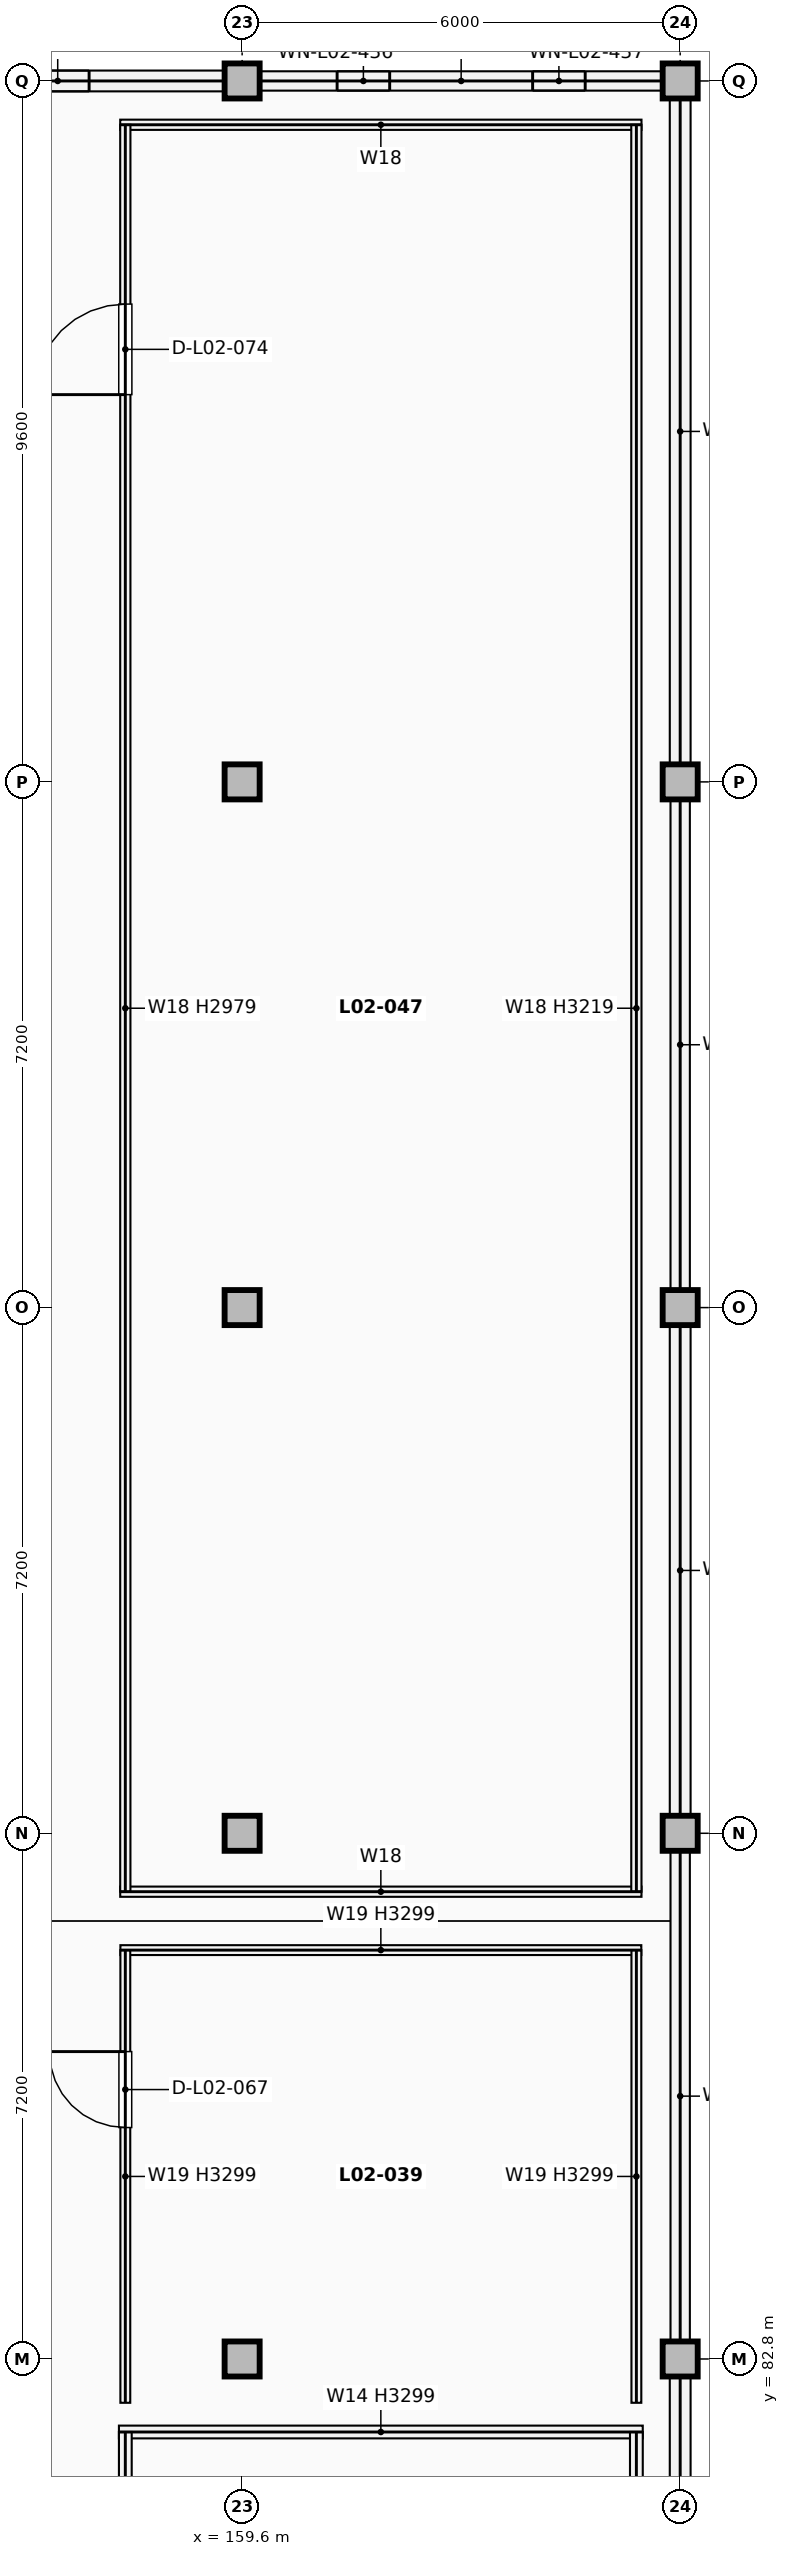
"""IFC4 building model, lengths in metres.
Left out: names, types, materials, properties, quantities, classifications, styles, units other than length and angle.
Written with IfcOpenShell. Run it as: python <this file> out.ifc"""

import sys

from ifc_helpers import new_model, si_unit, direction, frame, frame_2d, origin, origin_2d, place, context, subcontext, project, spatial, rectangle, extrude, element, fill, save


model = new_model("IFC4")
c1 = context("Model", 3, precision=1e-05, world=origin(), true_north=direction((0.0, 1.0)))
c2 = subcontext(c1, "Body", "Model", "MODEL_VIEW")
j1 = project(units=[si_unit("LENGTHUNIT", "METRE"), si_unit("PLANEANGLEUNIT", "RADIAN")], contexts=[c1])
p1 = place(None, origin())
s1 = spatial("IfcSite", under=j1, at=p1, CompositionType="ELEMENT")
p2 = place(p1, origin())
s2 = spatial("IfcBuilding", under=s1, at=p2, CompositionType="ELEMENT")
p3 = place(p2, frame((0.0, 0.0, 9.52)))
s3 = spatial("IfcBuildingStorey", under=s2, at=p3, CompositionType="ELEMENT", Elevation=9.52)
for number, where, z_axis, x_axis in (
    (1, (159.6, 82.8, 0.0), (0.0, 0.0, 1.0), (1.0, 0.0, 0.0)),
    (2, (159.6, 90.0, 0.0), (0.0, 0.0, 1.0), (1.0, 0.0, 0.0)),
    (3, (159.6, 97.2, 0.0), (0.0, 0.0, 1.0), (1.0, 0.0, 0.0)),
    (4, (159.6, 104.4, 0.0), (0.0, 0.0, 1.0), (1.0, 0.0, 0.0)),
    (5, (159.6, 114.0, 0.0), (0.0, 0.0, 1.0), (1.0, 0.0, 0.0)),
    (6, (165.6, 82.8, 0.0), (0.0, 0.0, 1.0), (1.0, 0.0, 0.0)),
    (7, (165.6, 90.0, 0.0), (0.0, 0.0, 1.0), (1.0, 0.0, 0.0)),
    (8, (165.6, 97.2, 0.0), (0.0, 0.0, 1.0), (1.0, 0.0, 0.0)),
    (9, (165.6, 104.4, 0.0), (0.0, 0.0, 1.0), (1.0, 0.0, 0.0)),
    (10, (165.6, 114.0, 0.0), (0.0, 0.0, 1.0), (1.0, 0.0, 0.0)),
):
    element("IfcColumn", number, at=place(p3, frame(where, z_axis=z_axis, x_axis=x_axis)), inside=s3, PredefinedType="COLUMN", context=c2, shape_type="SweptSolid", body=[
        extrude(rectangle(XDim=0.48, YDim=0.48, at=origin_2d()), origin(), (0.0, 0.0, 1.0), 4.08),
    ])
p4 = place(p3, frame((150.242, 114.0, 0.0), z_axis=(0.0, 0.0, 1.0), x_axis=(1.0, 0.0, 0.0)))
e11 = element("IfcWall", 11, at=p4, inside=s3, PredefinedType="SOLIDWALL", context=c2, shape_type="SweptSolid", body=[
    extrude(rectangle(XDim=9.116, YDim=0.285, at=frame_2d((4.558, 0.0))), origin(), (0.0, 0.0, 1.0), 3.299),
])
p5 = place(p4, frame((1.854, 0.0, 0.75)))
e12 = element("IfcOpeningElement", 12, at=p5, cuts=e11, PredefinedType="OPENING", context=c2, shape_type="SweptSolid", body=[
    extrude(rectangle(XDim=0.86, YDim=2.32, at=frame_2d((0.43, 1.16))), frame((0.0, 0.152, 0.0), z_axis=(0.0, -1.0, 0.0), x_axis=(1.0, 0.0, 0.0)), (0.0, 0.0, 1.0), 0.305),
])
p6 = place(p4, frame((4.128, 0.0, 0.75)))
e13 = element("IfcOpeningElement", 13, at=p6, cuts=e11, PredefinedType="OPENING", context=c2, shape_type="SweptSolid", body=[
    extrude(rectangle(XDim=0.86, YDim=2.32, at=frame_2d((0.43, 1.16))), frame((0.0, 0.152, 0.0), z_axis=(0.0, -1.0, 0.0), x_axis=(1.0, 0.0, 0.0)), (0.0, 0.0, 1.0), 0.305),
])
p7 = place(p4, frame((6.402, 0.0, 0.75)))
e14 = element("IfcOpeningElement", 14, at=p7, cuts=e11, PredefinedType="OPENING", context=c2, shape_type="SweptSolid", body=[
    extrude(rectangle(XDim=0.86, YDim=2.32, at=frame_2d((0.43, 1.16))), frame((0.0, 0.152, 0.0), z_axis=(0.0, -1.0, 0.0), x_axis=(1.0, 0.0, 0.0)), (0.0, 0.0, 1.0), 0.305),
])
p8 = place(p3, frame((159.842, 114.0, 0.0), z_axis=(0.0, 0.0, 1.0), x_axis=(1.0, 0.0, 0.0)))
e15 = element("IfcWall", 15, at=p8, inside=s3, PredefinedType="SOLIDWALL", context=c2, shape_type="SweptSolid", body=[
    extrude(rectangle(XDim=5.516, YDim=0.265, at=frame_2d((2.758, 0.0))), origin(), (0.0, 0.0, 1.0), 3.299),
])
p9 = place(p8, frame((1.059, 0.0, 0.75)))
e16 = element("IfcOpeningElement", 16, at=p9, cuts=e15, PredefinedType="OPENING", context=c2, shape_type="SweptSolid", body=[
    extrude(rectangle(XDim=0.72, YDim=2.24, at=frame_2d((0.36, 1.12))), frame((0.0, 0.143, 0.0), z_axis=(0.0, -1.0, 0.0), x_axis=(1.0, 0.0, 0.0)), (0.0, 0.0, 1.0), 0.285),
])
p10 = place(p8, frame((3.737, 0.0, 0.75)))
e17 = element("IfcOpeningElement", 17, at=p10, cuts=e15, PredefinedType="OPENING", context=c2, shape_type="SweptSolid", body=[
    extrude(rectangle(XDim=0.72, YDim=2.24, at=frame_2d((0.36, 1.12))), frame((0.0, 0.143, 0.0), z_axis=(0.0, -1.0, 0.0), x_axis=(1.0, 0.0, 0.0)), (0.0, 0.0, 1.0), 0.285),
])
p11 = place(p3, frame((165.6, 79.442, 0.0), z_axis=(0.0, 0.0, 1.0), x_axis=(0.0, 1.0, 0.0)))
e18 = element("IfcWall", 18, at=p11, inside=s3, PredefinedType="SOLIDWALL", context=c2, shape_type="SweptSolid", body=[
    extrude(rectangle(XDim=3.116, YDim=0.285, at=frame_2d((1.558, 0.0))), origin(), (0.0, 0.0, 1.0), 3.194),
])
p12 = place(p3, frame((165.6, 83.042, 0.0), z_axis=(0.0, 0.0, 1.0), x_axis=(0.0, 1.0, 0.0)))
e19 = element("IfcWall", 19, at=p12, inside=s3, PredefinedType="SOLIDWALL", context=c2, shape_type="SweptSolid", body=[
    extrude(rectangle(XDim=6.716, YDim=0.265, at=frame_2d((3.358, 0.0))), origin(), (0.0, 0.0, 1.0), 3.219),
])
p13 = place(p3, frame((165.6, 90.242, 0.0), z_axis=(0.0, 0.0, 1.0), x_axis=(0.0, 1.0, 0.0)))
e20 = element("IfcWall", 20, at=p13, inside=s3, PredefinedType="SOLIDWALL", context=c2, shape_type="SweptSolid", body=[
    extrude(rectangle(XDim=6.716, YDim=0.285, at=frame_2d((3.358, 0.0))), origin(), (0.0, 0.0, 1.0), 3.219),
])
p14 = place(p3, frame((165.6, 97.442, 0.0), z_axis=(0.0, 0.0, 1.0), x_axis=(0.0, 1.0, 0.0)))
e21 = element("IfcWall", 21, at=p14, inside=s3, PredefinedType="SOLIDWALL", context=c2, shape_type="SweptSolid", body=[
    extrude(rectangle(XDim=6.716, YDim=0.265, at=frame_2d((3.358, 0.0))), origin(), (0.0, 0.0, 1.0), 3.219),
])
p15 = place(p3, frame((165.6, 104.642, 0.0), z_axis=(0.0, 0.0, 1.0), x_axis=(0.0, 1.0, 0.0)))
e22 = element("IfcWall", 22, at=p15, inside=s3, PredefinedType="SOLIDWALL", context=c2, shape_type="SweptSolid", body=[
    extrude(rectangle(XDim=9.116, YDim=0.285, at=frame_2d((4.558, 0.0))), origin(), (0.0, 0.0, 1.0), 3.219),
])
p16 = place(p3, frame((157.913, 81.8, 0.0), z_axis=(0.0, 0.0, 1.0), x_axis=(1.0, 0.0, 0.0)))
e23 = element("IfcWall", 23, at=p16, inside=s3, PredefinedType="PARTITIONING", context=c2, shape_type="SweptSolid", body=[
    extrude(rectangle(XDim=7.175, YDim=0.175, at=frame_2d((3.587, 0.0))), origin(), (0.0, 0.0, 1.0), 3.299),
])
p17 = place(p3, frame((158.0, 72.2, 0.0), z_axis=(0.0, 0.0, 1.0), x_axis=(0.0, 1.0, 0.0)))
e24 = element("IfcWall", 24, at=p17, inside=s3, PredefinedType="PARTITIONING", context=c2, shape_type="SweptSolid", body=[
    extrude(rectangle(XDim=9.6, YDim=0.175, at=frame_2d((4.8, 0.0))), origin(), (0.0, 0.0, 1.0), 3.194),
])
p18 = place(p17, frame((2.245, 0.0, 0.0)))
e25 = element("IfcOpeningElement", 25, at=p18, cuts=e24, PredefinedType="OPENING", context=c2, shape_type="SweptSolid", body=[
    extrude(rectangle(XDim=1.02, YDim=2.18, at=frame_2d((0.51, 1.09))), frame((0.0, 0.098, 0.0), z_axis=(0.0, -1.0, 0.0), x_axis=(1.0, 0.0, 0.0)), (0.0, 0.0, 1.0), 0.195),
])
p19 = place(p3, frame((165.0, 72.2, 0.0), z_axis=(0.0, 0.0, 1.0), x_axis=(0.0, 1.0, 0.0)))
e26 = element("IfcWall", 26, at=p19, inside=s3, PredefinedType="PARTITIONING", context=c2, shape_type="SweptSolid", body=[
    extrude(rectangle(XDim=9.6, YDim=0.175, at=frame_2d((4.8, 0.0))), origin(), (0.0, 0.0, 1.0), 3.194),
])
p20 = place(p3, frame((157.933, 88.4, 0.0), z_axis=(0.0, 0.0, 1.0), x_axis=(1.0, 0.0, 0.0)))
e27 = element("IfcWall", 27, at=p20, inside=s3, PredefinedType="PARTITIONING", context=c2, shape_type="SweptSolid", body=[
    extrude(rectangle(XDim=7.135, YDim=0.135, at=frame_2d((3.567, 0.0))), origin(), (0.0, 0.0, 1.0), 3.299),
])
p21 = place(p3, frame((158.0, 82.2, 0.0), z_axis=(0.0, 0.0, 1.0), x_axis=(0.0, 1.0, 0.0)))
e28 = element("IfcWall", 28, at=p21, inside=s3, PredefinedType="PARTITIONING", context=c2, shape_type="SweptSolid", body=[
    extrude(rectangle(XDim=6.2, YDim=0.135, at=frame_2d((3.1, 0.0))), origin(), (0.0, 0.0, 1.0), 3.299),
])
p22 = place(p21, frame((3.77, 0.0, 0.0)))
e29 = element("IfcOpeningElement", 29, at=p22, cuts=e28, PredefinedType="OPENING", context=c2, shape_type="SweptSolid", body=[
    extrude(rectangle(XDim=1.04, YDim=2.12, at=frame_2d((0.52, 1.06))), frame((0.0, 0.078, 0.0), z_axis=(0.0, -1.0, 0.0), x_axis=(1.0, 0.0, 0.0)), (0.0, 0.0, 1.0), 0.155),
])
p23 = place(p3, frame((165.0, 82.2, 0.0), z_axis=(0.0, 0.0, 1.0), x_axis=(0.0, 1.0, 0.0)))
e30 = element("IfcWall", 30, at=p23, inside=s3, PredefinedType="PARTITIONING", context=c2, shape_type="SweptSolid", body=[
    extrude(rectangle(XDim=6.2, YDim=0.135, at=frame_2d((3.1, 0.0))), origin(), (0.0, 0.0, 1.0), 3.299),
])
for number, where, z_axis, x_axis in (
    (31, (157.93, 89.2, 0.0), (0.0, 0.0, 1.0), (1.0, 0.0, 0.0)),
    (32, (157.93, 113.4, 0.0), (0.0, 0.0, 1.0), (1.0, 0.0, 0.0)),
):
    element("IfcWall", number, at=place(p3, frame(where, z_axis=z_axis, x_axis=x_axis)), inside=s3, PredefinedType="PARTITIONING", context=c2, shape_type="SweptSolid", body=[
        extrude(rectangle(XDim=7.14, YDim=0.14, at=frame_2d((3.57, 0.0))), origin(), (0.0, 0.0, 1.0), 3.299),
    ])
p24 = place(p3, frame((158.0, 89.2, 0.0), z_axis=(0.0, 0.0, 1.0), x_axis=(0.0, 1.0, 0.0)))
e33 = element("IfcWall", 33, at=p24, inside=s3, PredefinedType="PARTITIONING", context=c2, shape_type="SweptSolid", body=[
    extrude(rectangle(XDim=24.2, YDim=0.14, at=frame_2d((12.1, 0.0))), origin(), (0.0, 0.0, 1.0), 2.979),
])
p25 = place(p24, frame((20.504, 0.0, 0.0)))
e34 = element("IfcOpeningElement", 34, at=p25, cuts=e33, PredefinedType="OPENING", context=c2, shape_type="SweptSolid", body=[
    extrude(rectangle(XDim=1.24, YDim=2.2, at=frame_2d((0.62, 1.1))), frame((0.0, 0.08, 0.0), z_axis=(0.0, -1.0, 0.0), x_axis=(1.0, 0.0, 0.0)), (0.0, 0.0, 1.0), 0.16),
])
p26 = place(p3, frame((165.0, 89.2, 0.0), z_axis=(0.0, 0.0, 1.0), x_axis=(0.0, 1.0, 0.0)))
e35 = element("IfcWall", 35, at=p26, inside=s3, PredefinedType="PARTITIONING", context=c2, shape_type="SweptSolid", body=[
    extrude(rectangle(XDim=24.2, YDim=0.14, at=frame_2d((12.1, 0.0))), origin(), (0.0, 0.0, 1.0), 3.219),
])
p27 = place(p7, origin())
e36 = element("IfcWindow", 36, at=p27, inside=s3, PartitioningType="SINGLE_PANEL", PredefinedType="WINDOW", context=c2, shape_type="SweptSolid", body=[
    extrude(rectangle(XDim=0.86, YDim=2.32, at=frame_2d((0.43, 1.16))), frame((0.0, 0.03, 0.0), z_axis=(0.0, -1.0, 0.0), x_axis=(1.0, 0.0, 0.0)), (0.0, 0.0, 1.0), 0.06),
])
fill(e14, e36)
p28 = place(p9, origin())
e37 = element("IfcWindow", 37, at=p28, inside=s3, PartitioningType="SINGLE_PANEL", PredefinedType="WINDOW", context=c2, shape_type="SweptSolid", body=[
    extrude(rectangle(XDim=0.72, YDim=2.24, at=frame_2d((0.36, 1.12))), frame((0.0, 0.03, 0.0), z_axis=(0.0, -1.0, 0.0), x_axis=(1.0, 0.0, 0.0)), (0.0, 0.0, 1.0), 0.06),
])
fill(e16, e37)
p29 = place(p10, origin())
e38 = element("IfcWindow", 38, at=p29, inside=s3, PartitioningType="SINGLE_PANEL", PredefinedType="WINDOW", context=c2, shape_type="SweptSolid", body=[
    extrude(rectangle(XDim=0.72, YDim=2.24, at=frame_2d((0.36, 1.12))), frame((0.0, 0.03, 0.0), z_axis=(0.0, -1.0, 0.0), x_axis=(1.0, 0.0, 0.0)), (0.0, 0.0, 1.0), 0.06),
])
fill(e17, e38)
p30 = place(p22, origin())
e39 = element("IfcDoor", 39, at=p30, inside=s3, OperationType="SINGLE_SWING_RIGHT", PredefinedType="DOOR", context=c2, shape_type="SweptSolid", body=[
    extrude(rectangle(XDim=1.04, YDim=2.12, at=frame_2d((0.52, 1.06))), frame((0.0, 0.025, 0.0), z_axis=(0.0, -1.0, 0.0), x_axis=(1.0, 0.0, 0.0)), (0.0, 0.0, 1.0), 0.05),
])
fill(e29, e39)
p31 = place(p25, origin())
e40 = element("IfcDoor", 40, at=p31, inside=s3, OperationType="SINGLE_SWING_LEFT", PredefinedType="DOOR", context=c2, shape_type="SweptSolid", body=[
    extrude(rectangle(XDim=1.24, YDim=2.2, at=frame_2d((0.62, 1.1))), frame((0.0, 0.025, 0.0), z_axis=(0.0, -1.0, 0.0), x_axis=(1.0, 0.0, 0.0)), (0.0, 0.0, 1.0), 0.05),
])
fill(e34, e40)
save(model, sys.argv[1])
